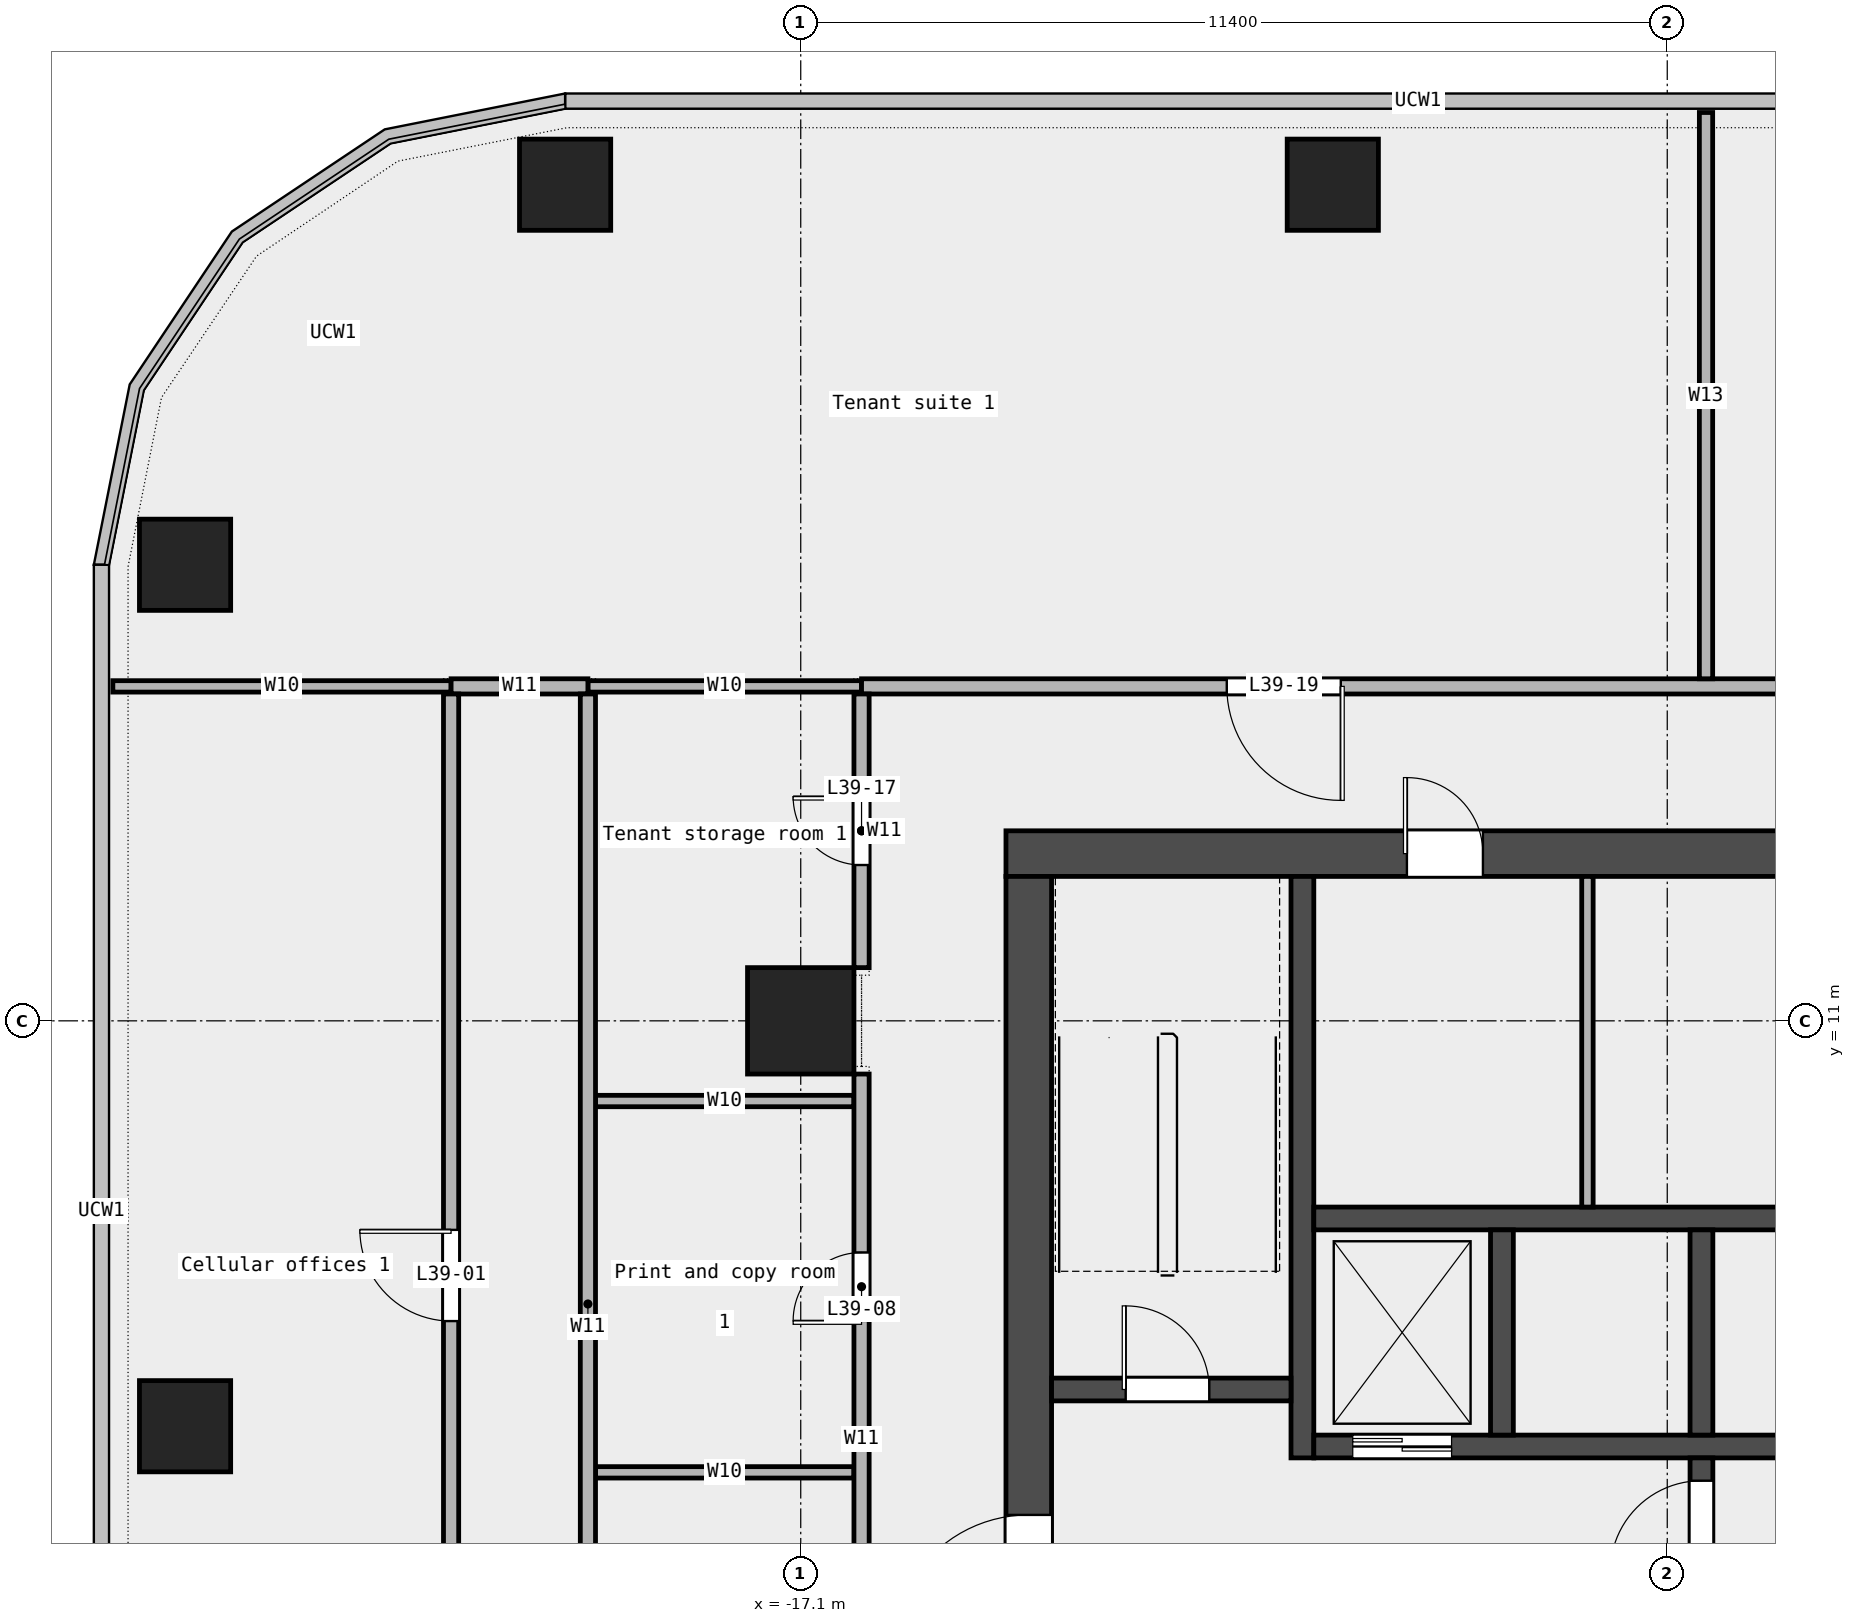
"""IFC4 building model, lengths in metres.
Left out: names, types, materials, properties, quantities, classifications, styles, units other than length and angle.
Written with IfcOpenShell. Run it as: python <this file> out.ifc"""

import sys

from ifc_helpers import new_model, si_unit, direction, frame, frame_2d, origin, origin_2d, place, context, subcontext, project, spatial, rectangle, extrude, element, fill, save


model = new_model("IFC4")
c1 = context("Model", 3, precision=1e-05, world=origin(), true_north=direction((0.0, 1.0)))
c2 = subcontext(c1, "Body", "Model", "MODEL_VIEW")
j1 = project(units=[si_unit("LENGTHUNIT", "METRE"), si_unit("PLANEANGLEUNIT", "RADIAN")], contexts=[c1])
p1 = place(None, origin())
s1 = spatial("IfcSite", under=j1, at=p1, CompositionType="ELEMENT")
p2 = place(p1, origin())
s2 = spatial("IfcBuilding", under=s1, at=p2, CompositionType="ELEMENT")
p3 = place(p2, frame((0.0, 0.0, 189.0)))
s3 = spatial("IfcBuildingStorey", under=s2, at=p3, CompositionType="ELEMENT", Elevation=189.0)
for number, where, z_axis, x_axis in (
    (1, (-10.1, 22.0, 0.0), (0.0, 0.0, 1.0), (1.0, 0.0, 0.0)),
    (2, (-20.2, 22.0, 0.0), (0.0, 0.0, 1.0), (1.0, 0.0, 0.0)),
    (3, (-25.2, 17.0, 0.0), (0.0, 0.0, 1.0), (1.0, 0.0, 0.0)),
    (4, (-25.2, 5.667, 0.0), (0.0, 0.0, 1.0), (1.0, 0.0, 0.0)),
):
    element("IfcColumn", number, at=place(p3, frame(where, z_axis=z_axis, x_axis=x_axis)), inside=s3, PredefinedType="COLUMN", context=c2, shape_type="SweptSolid", body=[
        extrude(rectangle(XDim=1.2, YDim=1.2, at=origin_2d()), origin(), (0.0, 0.0, 1.0), 3.6),
    ])
p4 = place(p3, frame((-17.1, 11.0, 0.0), z_axis=(0.0, 0.0, 1.0), x_axis=(1.0, 0.0, 0.0)))
e5 = element("IfcColumn", 5, at=p4, inside=s3, PredefinedType="COLUMN", context=c2, shape_type="SweptSolid", body=[
    extrude(rectangle(XDim=1.4, YDim=1.4, at=origin_2d()), origin(), (0.0, 0.0, 1.0), 3.6),
])
for number, where, z_axis, x_axis in (
    (6, (-19.8, 5.06, 0.0), (0.0, 0.0, 1.0), (1.0, 0.0, 0.0)),
    (7, (-19.8, 9.945, 0.0), (0.0, 0.0, 1.0), (1.0, 0.0, 0.0)),
):
    element("IfcWall", number, at=place(p3, frame(where, z_axis=z_axis, x_axis=x_axis)), inside=s3, PredefinedType="PARTITIONING", context=c2, shape_type="SweptSolid", body=[
        extrude(rectangle(XDim=3.4, YDim=0.15, at=frame_2d((1.7, 0.0))), origin(), (0.0, 0.0, 1.0), 3.6),
    ])
p5 = place(p3, frame((-26.15, 15.4, 0.0), z_axis=(0.0, 0.0, 1.0), x_axis=(1.0, 0.0, 0.0)))
e8 = element("IfcWall", 8, at=p5, inside=s3, PredefinedType="PARTITIONING", context=c2, shape_type="SweptSolid", body=[
    extrude(rectangle(XDim=4.45, YDim=0.15, at=frame_2d((2.225, 0.0))), origin(), (0.0, 0.0, 1.0), 3.6),
])
p6 = place(p3, frame((-19.9, 15.4, 0.0), z_axis=(0.0, 0.0, 1.0), x_axis=(1.0, 0.0, 0.0)))
e9 = element("IfcWall", 9, at=p6, inside=s3, PredefinedType="PARTITIONING", context=c2, shape_type="SweptSolid", body=[
    extrude(rectangle(XDim=3.6, YDim=0.15, at=frame_2d((1.8, 0.0))), origin(), (0.0, 0.0, 1.0), 3.6),
])
p7 = place(p3, frame((-21.7, 15.4, 0.0), z_axis=(0.0, 0.0, 1.0), x_axis=(1.0, 0.0, 0.0)))
e10 = element("IfcWall", 10, at=p7, inside=s3, PredefinedType="PARTITIONING", context=c2, shape_type="SweptSolid", body=[
    extrude(rectangle(XDim=1.8, YDim=0.2, at=frame_2d((0.9, 0.0))), origin(), (0.0, 0.0, 1.0), 3.6),
])
p8 = place(p3, frame((-16.3, 15.4, 0.0), z_axis=(0.0, 0.0, 1.0), x_axis=(1.0, 0.0, 0.0)))
e11 = element("IfcWall", 11, at=p8, inside=s3, PredefinedType="PARTITIONING", context=c2, shape_type="SweptSolid", body=[
    extrude(rectangle(XDim=32.6, YDim=0.2, at=frame_2d((16.3, 0.0))), origin(), (0.0, 0.0, 1.0), 3.6),
])
p9 = place(p8, frame((24.677, 0.0, 0.0)))
e12 = element("IfcOpeningElement", 12, at=p9, cuts=e11, PredefinedType="OPENING", context=c2, shape_type="SweptSolid", body=[
    extrude(rectangle(XDim=1.2, YDim=2.1, at=frame_2d((0.6, 1.05))), frame((0.0, 0.112, 0.0), z_axis=(0.0, -1.0, 0.0), x_axis=(1.0, 0.0, 0.0)), (0.0, 0.0, 1.0), 0.224),
])
p10 = place(p8, frame((4.805, 0.0, 0.0)))
e13 = element("IfcOpeningElement", 13, at=p10, cuts=e11, PredefinedType="OPENING", context=c2, shape_type="SweptSolid", body=[
    extrude(rectangle(XDim=1.5, YDim=2.1, at=frame_2d((0.75, 1.05))), frame((0.0, 0.112, 0.0), z_axis=(0.0, -1.0, 0.0), x_axis=(1.0, 0.0, 0.0)), (0.0, 0.0, 1.0), 0.224),
])
p11 = place(p8, frame((14.228, 0.0, 0.0)))
e14 = element("IfcOpeningElement", 14, at=p11, cuts=e11, PredefinedType="OPENING", context=c2, shape_type="SweptSolid", body=[
    extrude(rectangle(XDim=1.2, YDim=2.1, at=frame_2d((0.6, 1.05))), frame((0.0, 0.112, 0.0), z_axis=(0.0, -1.0, 0.0), x_axis=(1.0, 0.0, 0.0)), (0.0, 0.0, 1.0), 0.224),
])
p12 = place(p3, frame((-21.7, -9.0, 0.0), z_axis=(0.0, 0.0, 1.0), x_axis=(0.0, 1.0, 0.0)))
e15 = element("IfcWall", 15, at=p12, inside=s3, PredefinedType="PARTITIONING", context=c2, shape_type="SweptSolid", body=[
    extrude(rectangle(XDim=24.3, YDim=0.2, at=frame_2d((12.15, 0.0))), origin(), (0.0, 0.0, 1.0), 3.6),
])
p13 = place(p12, frame((16.05, 0.0, 0.0)))
e16 = element("IfcOpeningElement", 16, at=p13, cuts=e15, PredefinedType="OPENING", context=c2, shape_type="SweptSolid", body=[
    extrude(rectangle(XDim=1.2, YDim=2.1, at=frame_2d((0.6, 1.05))), frame((0.0, 0.112, 0.0), z_axis=(0.0, -1.0, 0.0), x_axis=(1.0, 0.0, 0.0)), (0.0, 0.0, 1.0), 0.224),
])
p14 = place(p3, frame((-19.9, -0.75, 0.0), z_axis=(0.0, 0.0, 1.0), x_axis=(0.0, 1.0, 0.0)))
e17 = element("IfcWall", 17, at=p14, inside=s3, PredefinedType="PARTITIONING", context=c2, shape_type="SweptSolid", body=[
    extrude(rectangle(XDim=16.05, YDim=0.2, at=frame_2d((8.025, 0.0))), origin(), (0.0, 0.0, 1.0), 3.6),
])
p15 = place(p3, frame((-16.3, 0.7, 0.0), z_axis=(0.0, 0.0, 1.0), x_axis=(0.0, 1.0, 0.0)))
e18 = element("IfcWall", 18, at=p15, inside=s3, PredefinedType="PARTITIONING", context=c2, shape_type="SweptSolid", body=[
    extrude(rectangle(XDim=9.6, YDim=0.2, at=frame_2d((4.8, 0.0))), origin(), (0.0, 0.0, 1.0), 3.6),
])
p16 = place(p15, frame((1.73, 0.0, 0.0)))
e19 = element("IfcOpeningElement", 19, at=p16, cuts=e18, PredefinedType="OPENING", context=c2, shape_type="SweptSolid", body=[
    extrude(rectangle(XDim=0.9, YDim=2.1, at=frame_2d((0.45, 1.05))), frame((0.0, 0.112, 0.0), z_axis=(0.0, -1.0, 0.0), x_axis=(1.0, 0.0, 0.0)), (0.0, 0.0, 1.0), 0.224),
])
p17 = place(p15, frame((6.353, 0.0, 0.0)))
e20 = element("IfcOpeningElement", 20, at=p17, cuts=e18, PredefinedType="OPENING", context=c2, shape_type="SweptSolid", body=[
    extrude(rectangle(XDim=0.9, YDim=2.1, at=frame_2d((0.45, 1.05))), frame((0.0, 0.112, 0.0), z_axis=(0.0, -1.0, 0.0), x_axis=(1.0, 0.0, 0.0)), (0.0, 0.0, 1.0), 0.224),
])
p18 = place(p3, frame((-16.3, 11.7, 0.0), z_axis=(0.0, 0.0, 1.0), x_axis=(0.0, 1.0, 0.0)))
e21 = element("IfcWall", 21, at=p18, inside=s3, PredefinedType="PARTITIONING", context=c2, shape_type="SweptSolid", body=[
    extrude(rectangle(XDim=3.6, YDim=0.2, at=frame_2d((1.8, 0.0))), origin(), (0.0, 0.0, 1.0), 3.6),
])
p19 = place(p18, frame((1.35, 0.0, 0.0)))
e22 = element("IfcOpeningElement", 22, at=p19, cuts=e21, PredefinedType="OPENING", context=c2, shape_type="SweptSolid", body=[
    extrude(rectangle(XDim=0.9, YDim=2.1, at=frame_2d((0.45, 1.05))), frame((0.0, 0.112, 0.0), z_axis=(0.0, -1.0, 0.0), x_axis=(1.0, 0.0, 0.0)), (0.0, 0.0, 1.0), 0.224),
])
p20 = place(p3, frame((-5.19, 15.5, 0.0), z_axis=(0.0, 0.0, 1.0), x_axis=(0.0, 1.0, 0.0)))
e23 = element("IfcWall", 23, at=p20, inside=s3, PredefinedType="PARTITIONING", context=c2, shape_type="SweptSolid", body=[
    extrude(rectangle(XDim=7.45, YDim=0.175, at=frame_2d((3.725, 0.0))), origin(), (0.0, 0.0, 1.0), 3.6),
])
p21 = place(p3, frame((-14.4, 13.2, 0.0), z_axis=(0.0, 0.0, 1.0), x_axis=(1.0, 0.0, 0.0)))
e24 = element("IfcWall", 24, at=p21, inside=s3, PredefinedType="SHEAR", context=c2, shape_type="SweptSolid", body=[
    extrude(rectangle(XDim=28.8, YDim=0.6, at=frame_2d((14.4, 0.0))), origin(), (0.0, 0.0, 1.0), 3.7),
])
p22 = place(p21, frame((5.275, 0.0, 0.0)))
e25 = element("IfcOpeningElement", 25, at=p22, cuts=e24, PredefinedType="OPENING", context=c2, shape_type="SweptSolid", body=[
    extrude(rectangle(XDim=1.0, YDim=2.1, at=frame_2d((0.5, 1.05))), frame((0.0, 0.312, 0.0), z_axis=(0.0, -1.0, 0.0), x_axis=(1.0, 0.0, 0.0)), (0.0, 0.0, 1.0), 0.624),
])
p23 = place(p21, frame((10.525, 0.0, 0.0)))
e26 = element("IfcOpeningElement", 26, at=p23, cuts=e24, PredefinedType="OPENING", context=c2, shape_type="SweptSolid", body=[
    extrude(rectangle(XDim=1.0, YDim=2.1, at=frame_2d((0.5, 1.05))), frame((0.0, 0.312, 0.0), z_axis=(0.0, -1.0, 0.0), x_axis=(1.0, 0.0, 0.0)), (0.0, 0.0, 1.0), 0.624),
])
p24 = place(p21, frame((15.587, 0.0, 0.0)))
e27 = element("IfcOpeningElement", 27, at=p24, cuts=e24, PredefinedType="OPENING", context=c2, shape_type="SweptSolid", body=[
    extrude(rectangle(XDim=1.0, YDim=2.1, at=frame_2d((0.5, 1.05))), frame((0.0, 0.312, 0.0), z_axis=(0.0, -1.0, 0.0), x_axis=(1.0, 0.0, 0.0)), (0.0, 0.0, 1.0), 0.624),
])
p25 = place(p21, frame((19.15, 0.0, 0.0)))
e28 = element("IfcOpeningElement", 28, at=p25, cuts=e24, PredefinedType="OPENING", context=c2, shape_type="SweptSolid", body=[
    extrude(rectangle(XDim=1.0, YDim=2.1, at=frame_2d((0.5, 1.05))), frame((0.0, 0.312, 0.0), z_axis=(0.0, -1.0, 0.0), x_axis=(1.0, 0.0, 0.0)), (0.0, 0.0, 1.0), 0.624),
])
p26 = place(p21, frame((22.712, 0.0, 0.0)))
e29 = element("IfcOpeningElement", 29, at=p26, cuts=e24, PredefinedType="OPENING", context=c2, shape_type="SweptSolid", body=[
    extrude(rectangle(XDim=1.0, YDim=2.1, at=frame_2d((0.5, 1.05))), frame((0.0, 0.312, 0.0), z_axis=(0.0, -1.0, 0.0), x_axis=(1.0, 0.0, 0.0)), (0.0, 0.0, 1.0), 0.624),
])
p27 = place(p3, frame((-14.1, -6.6, 0.0), z_axis=(0.0, 0.0, 1.0), x_axis=(0.0, 1.0, 0.0)))
e30 = element("IfcWall", 30, at=p27, inside=s3, PredefinedType="SHEAR", context=c2, shape_type="SweptSolid", body=[
    extrude(rectangle(XDim=19.5, YDim=0.6, at=frame_2d((9.75, 0.0))), origin(), (0.0, 0.0, 1.0), 3.7),
])
p28 = place(p27, frame((9.3, 0.0, 0.0)))
e31 = element("IfcOpeningElement", 31, at=p28, cuts=e30, PredefinedType="OPENING", context=c2, shape_type="SweptSolid", body=[
    extrude(rectangle(XDim=1.8, YDim=2.1, at=frame_2d((0.9, 1.05))), frame((0.0, 0.312, 0.0), z_axis=(0.0, -1.0, 0.0), x_axis=(1.0, 0.0, 0.0)), (0.0, 0.0, 1.0), 0.624),
])
p29 = place(p3, frame((-10.5, 5.25, 0.0), z_axis=(0.0, 0.0, 1.0), x_axis=(0.0, 1.0, 0.0)))
e32 = element("IfcWall", 32, at=p29, inside=s3, PredefinedType="SHEAR", context=c2, shape_type="SweptSolid", body=[
    extrude(rectangle(XDim=7.65, YDim=0.3, at=frame_2d((3.825, 0.0))), origin(), (0.0, 0.0, 1.0), 3.7),
])
p30 = place(p3, frame((-13.8, 6.15, 0.0), z_axis=(0.0, 0.0, 1.0), x_axis=(1.0, 0.0, 0.0)))
e33 = element("IfcWall", 33, at=p30, inside=s3, PredefinedType="SOLIDWALL", context=c2, shape_type="SweptSolid", body=[
    extrude(rectangle(XDim=3.15, YDim=0.3, at=frame_2d((1.575, 0.0))), origin(), (0.0, 0.0, 1.0), 3.7),
])
p31 = place(p30, frame((0.975, 0.0, 0.0)))
e34 = element("IfcOpeningElement", 34, at=p31, cuts=e33, PredefinedType="OPENING", context=c2, shape_type="SweptSolid", body=[
    extrude(rectangle(XDim=1.1, YDim=2.1, at=frame_2d((0.55, 1.05))), frame((0.0, 0.162, 0.0), z_axis=(0.0, -1.0, 0.0), x_axis=(1.0, 0.0, 0.0)), (0.0, 0.0, 1.0), 0.324),
])
p32 = place(p3, frame((-10.35, 5.4, 0.0), z_axis=(0.0, 0.0, 1.0), x_axis=(1.0, 0.0, 0.0)))
e35 = element("IfcWall", 35, at=p32, inside=s3, PredefinedType="SOLIDWALL", context=c2, shape_type="SweptSolid", body=[
    extrude(rectangle(XDim=20.7, YDim=0.3, at=frame_2d((10.35, 0.0))), origin(), (0.0, 0.0, 1.0), 3.7),
])
p33 = place(p32, frame((0.512, 0.0, 0.0)))
e36 = element("IfcOpeningElement", 36, at=p33, cuts=e35, PredefinedType="OPENING", context=c2, shape_type="SweptSolid", body=[
    extrude(rectangle(XDim=1.3, YDim=2.1, at=frame_2d((0.65, 1.05))), frame((0.0, 0.162, 0.0), z_axis=(0.0, -1.0, 0.0), x_axis=(1.0, 0.0, 0.0)), (0.0, 0.0, 1.0), 0.324),
])
p34 = place(p3, frame((-10.35, 8.4, 0.0), z_axis=(0.0, 0.0, 1.0), x_axis=(1.0, 0.0, 0.0)))
e37 = element("IfcWall", 37, at=p34, inside=s3, PredefinedType="SOLIDWALL", context=c2, shape_type="SweptSolid", body=[
    extrude(rectangle(XDim=20.7, YDim=0.3, at=frame_2d((10.35, 0.0))), origin(), (0.0, 0.0, 1.0), 3.7),
])
for number, where, z_axis, x_axis in (
    (38, (-7.875, 5.55, 0.0), (0.0, 0.0, 1.0), (0.0, 1.0, 0.0)),
    (39, (-5.25, 5.55, 0.0), (0.0, 0.0, 1.0), (0.0, 1.0, 0.0)),
):
    element("IfcWall", number, at=place(p3, frame(where, z_axis=z_axis, x_axis=x_axis)), inside=s3, PredefinedType="SOLIDWALL", context=c2, shape_type="SweptSolid", body=[
        extrude(rectangle(XDim=2.7, YDim=0.3, at=frame_2d((1.35, 0.0))), origin(), (0.0, 0.0, 1.0), 3.7),
    ])
p35 = place(p3, frame((-5.25, 1.95, 0.0), z_axis=(0.0, 0.0, 1.0), x_axis=(0.0, 1.0, 0.0)))
e40 = element("IfcWall", 40, at=p35, inside=s3, PredefinedType="SOLIDWALL", context=c2, shape_type="SweptSolid", body=[
    extrude(rectangle(XDim=3.3, YDim=0.3, at=frame_2d((1.65, 0.0))), origin(), (0.0, 0.0, 1.0), 3.7),
])
p36 = place(p35, frame((0.3, 0.0, 0.0)))
e41 = element("IfcOpeningElement", 41, at=p36, cuts=e40, PredefinedType="OPENING", context=c2, shape_type="SweptSolid", body=[
    extrude(rectangle(XDim=1.2, YDim=2.1, at=frame_2d((0.6, 1.05))), frame((0.0, 0.162, 0.0), z_axis=(0.0, -1.0, 0.0), x_axis=(1.0, 0.0, 0.0)), (0.0, 0.0, 1.0), 0.324),
])
p37 = place(p35, frame((1.8, 0.0, 0.0)))
e42 = element("IfcOpeningElement", 42, at=p37, cuts=e40, PredefinedType="OPENING", context=c2, shape_type="SweptSolid", body=[
    extrude(rectangle(XDim=1.2, YDim=2.1, at=frame_2d((0.6, 1.05))), frame((0.0, 0.162, 0.0), z_axis=(0.0, -1.0, 0.0), x_axis=(1.0, 0.0, 0.0)), (0.0, 0.0, 1.0), 0.324),
])
p38 = place(p3, frame((-6.75, 8.55, 0.0), z_axis=(0.0, 0.0, 1.0), x_axis=(0.0, 1.0, 0.0)))
e43 = element("IfcWall", 43, at=p38, inside=s3, PredefinedType="PARTITIONING", context=c2, shape_type="SweptSolid", body=[
    extrude(rectangle(XDim=4.35, YDim=0.15, at=frame_2d((2.175, 0.0))), origin(), (0.0, 0.0, 1.0), 3.7),
])
p39 = place(p13, origin())
e44 = element("IfcDoor", 44, at=p39, inside=s3, OperationType="SINGLE_SWING_RIGHT", PredefinedType="DOOR", context=c2, shape_type="SweptSolid", body=[
    extrude(rectangle(XDim=1.2, YDim=2.1, at=frame_2d((0.6, 1.05))), frame((0.0, 0.025, 0.0), z_axis=(0.0, -1.0, 0.0), x_axis=(1.0, 0.0, 0.0)), (0.0, 0.0, 1.0), 0.05),
])
fill(e16, e44)
p40 = place(p17, origin())
e45 = element("IfcDoor", 45, at=p40, inside=s3, OperationType="SINGLE_SWING_LEFT", PredefinedType="DOOR", context=c2, shape_type="SweptSolid", body=[
    extrude(rectangle(XDim=0.9, YDim=2.1, at=frame_2d((0.45, 1.05))), frame((0.0, 0.025, 0.0), z_axis=(0.0, -1.0, 0.0), x_axis=(1.0, 0.0, 0.0)), (0.0, 0.0, 1.0), 0.05),
])
fill(e20, e45)
p41 = place(p19, origin())
e46 = element("IfcDoor", 46, at=p41, inside=s3, OperationType="SINGLE_SWING_RIGHT", PredefinedType="DOOR", context=c2, shape_type="SweptSolid", body=[
    extrude(rectangle(XDim=0.9, YDim=2.1, at=frame_2d((0.45, 1.05))), frame((0.0, 0.025, 0.0), z_axis=(0.0, -1.0, 0.0), x_axis=(1.0, 0.0, 0.0)), (0.0, 0.0, 1.0), 0.05),
])
fill(e22, e46)
p42 = place(p10, origin())
e47 = element("IfcDoor", 47, at=p42, inside=s3, OperationType="DOUBLE_DOOR_SINGLE_SWING", PredefinedType="DOOR", context=c2, shape_type="SweptSolid", body=[
    extrude(rectangle(XDim=1.5, YDim=2.1, at=frame_2d((0.75, 1.05))), frame((0.0, 0.025, 0.0), z_axis=(0.0, -1.0, 0.0), x_axis=(1.0, 0.0, 0.0)), (0.0, 0.0, 1.0), 0.05),
])
fill(e13, e47)
p43 = place(p31, origin())
e48 = element("IfcDoor", 48, at=p43, inside=s3, OperationType="SINGLE_SWING_LEFT", PredefinedType="DOOR", context=c2, shape_type="SweptSolid", body=[
    extrude(rectangle(XDim=1.1, YDim=2.1, at=frame_2d((0.55, 1.05))), frame((0.0, 0.025, 0.0), z_axis=(0.0, -1.0, 0.0), x_axis=(1.0, 0.0, 0.0)), (0.0, 0.0, 1.0), 0.05),
])
fill(e34, e48)
p44 = place(p28, origin())
e49 = element("IfcDoor", 49, at=p44, inside=s3, OperationType="DOUBLE_DOOR_SINGLE_SWING", PredefinedType="DOOR", context=c2, shape_type="SweptSolid", body=[
    extrude(rectangle(XDim=1.8, YDim=2.1, at=frame_2d((0.9, 1.05))), frame((0.0, 0.025, 0.0), z_axis=(0.0, -1.0, 0.0), x_axis=(1.0, 0.0, 0.0)), (0.0, 0.0, 1.0), 0.05),
])
fill(e31, e49)
p45 = place(p37, origin())
e50 = element("IfcDoor", 50, at=p45, inside=s3, OperationType="SINGLE_SWING_RIGHT", PredefinedType="DOOR", context=c2, shape_type="SweptSolid", body=[
    extrude(rectangle(XDim=1.2, YDim=2.1, at=frame_2d((0.6, 1.05))), frame((0.0, 0.025, 0.0), z_axis=(0.0, -1.0, 0.0), x_axis=(1.0, 0.0, 0.0)), (0.0, 0.0, 1.0), 0.05),
])
fill(e42, e50)
p46 = place(p33, origin())
e51 = element("IfcDoor", 51, at=p46, inside=s3, OperationType="DOUBLE_DOOR_SLIDING", PredefinedType="DOOR", context=c2, shape_type="SweptSolid", body=[
    extrude(rectangle(XDim=1.3, YDim=2.1, at=frame_2d((0.65, 1.05))), frame((0.0, 0.025, 0.0), z_axis=(0.0, -1.0, 0.0), x_axis=(1.0, 0.0, 0.0)), (0.0, 0.0, 1.0), 0.05),
])
fill(e36, e51)
p47 = place(p22, origin())
e52 = element("IfcDoor", 52, at=p47, inside=s3, OperationType="SINGLE_SWING_LEFT", PredefinedType="DOOR", context=c2, shape_type="SweptSolid", body=[
    extrude(rectangle(XDim=1.0, YDim=2.1, at=frame_2d((0.5, 1.05))), frame((0.0, 0.025, 0.0), z_axis=(0.0, -1.0, 0.0), x_axis=(1.0, 0.0, 0.0)), (0.0, 0.0, 1.0), 0.05),
])
fill(e25, e52)
save(model, sys.argv[1])
